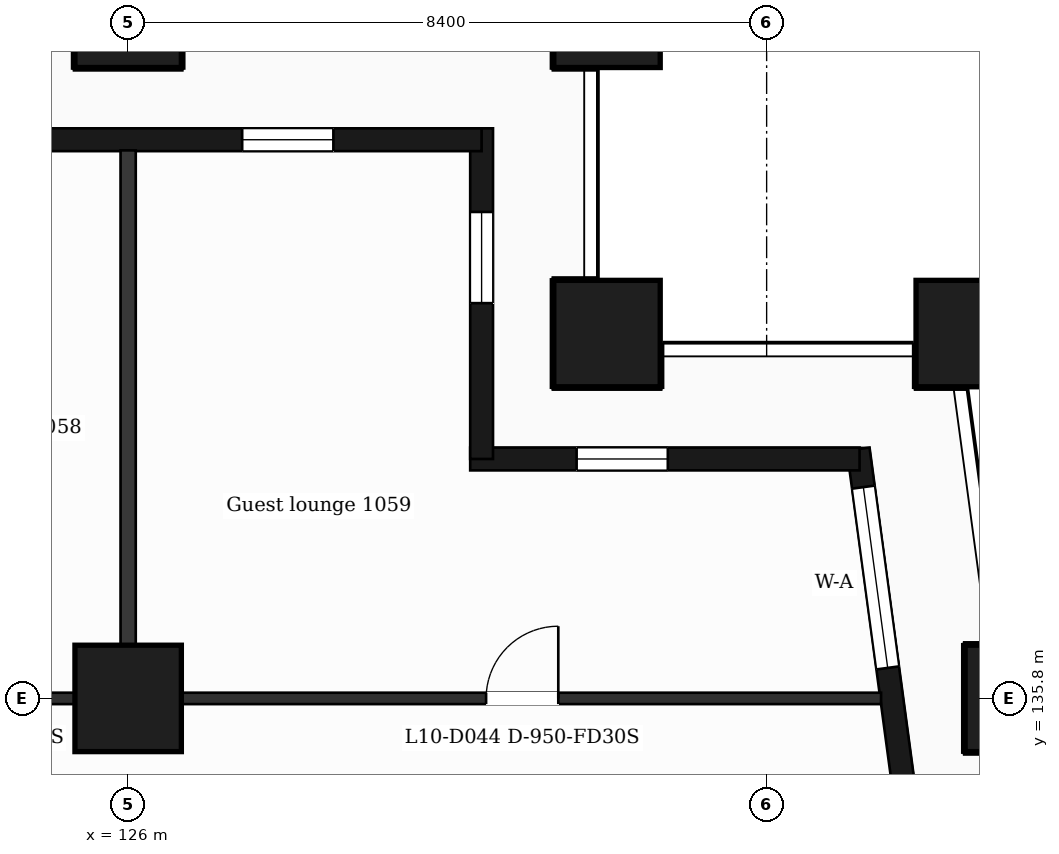
"""IFC4 building model, lengths in metres.
Left out: names, types, materials, properties, quantities, classifications, styles, units other than length and angle.
Written with IfcOpenShell. Run it as: python <this file> out.ifc"""

import sys

from ifc_helpers import new_model, si_unit, direction, frame, frame_2d, origin, origin_2d, place, context, subcontext, project, spatial, rectangle, extrude, element, fill, save


model = new_model("IFC4")
c1 = context("Model", 3, precision=1e-05, world=origin(), true_north=direction((0.0, 1.0)))
c2 = subcontext(c1, "Body", "Model", "MODEL_VIEW")
j1 = project(units=[si_unit("LENGTHUNIT", "METRE"), si_unit("PLANEANGLEUNIT", "RADIAN")], contexts=[c1])
p1 = place(None, origin())
s1 = spatial("IfcSite", under=j1, at=p1, CompositionType="ELEMENT")
p2 = place(p1, origin())
s2 = spatial("IfcBuilding", under=s1, at=p2, CompositionType="ELEMENT")
p3 = place(p2, frame((0.0, 0.0, 53.0)))
s3 = spatial("IfcBuildingStorey", under=s2, at=p3, CompositionType="ELEMENT", Elevation=53.0)
for number, where, z_axis, x_axis in (
    (1, (132.3, 140.6, 0.0), (0.0, 0.0, 1.0), (1.0, 0.0, 0.0)),
    (2, (137.065, 140.6, 0.0), (0.0, 0.0, 1.0), (1.0, 0.0, 0.0)),
    (3, (126.0, 135.8, 0.0), (0.0, 0.0, 1.0), (1.0, 0.0, 0.0)),
    (4, (137.711, 135.8, 0.0), (0.0, 0.0, 1.0), (1.0, 0.0, 0.0)),
    (5, (126.0, 144.8, 0.0), (0.0, 0.0, 1.0), (1.0, 0.0, 0.0)),
    (6, (132.3, 144.8, 0.0), (0.0, 0.0, 1.0), (1.0, 0.0, 0.0)),
):
    element("IfcColumn", number, at=place(p3, frame(where, z_axis=z_axis, x_axis=x_axis)), inside=s3, PredefinedType="COLUMN", context=c2, shape_type="SweptSolid", body=[
        extrude(rectangle(XDim=1.4, YDim=1.4, at=origin_2d()), origin(), (0.0, 0.0, 1.0), 3.5),
    ])
p4 = place(p3, frame((136.504, 132.4, 0.0), z_axis=(0.0, 0.0, 1.0), x_axis=(-0.133399697462, 0.99106231929, 0.0)))
e7 = element("IfcWall", 7, at=p4, inside=s3, PredefinedType="SOLIDWALL", context=c2, shape_type="SweptSolid", body=[
    extrude(rectangle(XDim=6.74, YDim=0.3, at=frame_2d((3.37, 0.0))), origin(), (0.0, 0.0, 1.0), 3.18),
])
p5 = place(p4, frame((1.115, 0.0, 0.0)))
e8 = element("IfcOpeningElement", 8, at=p5, cuts=e7, PredefinedType="OPENING", context=c2, shape_type="SweptSolid", body=[
    extrude(rectangle(XDim=1.2, YDim=2.4, at=frame_2d((0.6, 1.2))), frame((0.0, 0.16, 0.0), z_axis=(0.0, -1.0, 0.0), x_axis=(1.0, 0.0, 0.0)), (0.0, 0.0, 1.0), 0.32),
])
p6 = place(p4, frame((3.835, 0.0, 0.9)))
e9 = element("IfcOpeningElement", 9, at=p6, cuts=e7, PredefinedType="OPENING", context=c2, shape_type="SweptSolid", body=[
    extrude(rectangle(XDim=2.4, YDim=2.1, at=frame_2d((1.2, 1.05))), frame((0.0, 0.16, 0.0), z_axis=(0.0, -1.0, 0.0), x_axis=(1.0, 0.0, 0.0)), (0.0, 0.0, 1.0), 0.32),
])
p7 = place(p3, frame((135.623, 138.95, 0.0), z_axis=(0.0, 0.0, 1.0), x_axis=(-1.0, 0.0, 0.0)))
e10 = element("IfcWall", 10, at=p7, inside=s3, PredefinedType="SOLIDWALL", context=c2, shape_type="SweptSolid", body=[
    extrude(rectangle(XDim=5.123, YDim=0.3, at=frame_2d((2.561, 0.0))), origin(), (0.0, 0.0, 1.0), 3.18),
])
p8 = place(p7, frame((2.523, 0.0, 0.9)))
e11 = element("IfcOpeningElement", 11, at=p8, cuts=e10, PredefinedType="OPENING", context=c2, shape_type="SweptSolid", body=[
    extrude(rectangle(XDim=1.2, YDim=2.1, at=frame_2d((0.6, 1.05))), frame((0.0, 0.16, 0.0), z_axis=(0.0, -1.0, 0.0), x_axis=(1.0, 0.0, 0.0)), (0.0, 0.0, 1.0), 0.32),
])
p9 = place(p3, frame((130.65, 138.95, 0.0), z_axis=(0.0, 0.0, 1.0), x_axis=(0.0, 1.0, 0.0)))
e12 = element("IfcWall", 12, at=p9, inside=s3, PredefinedType="SOLIDWALL", context=c2, shape_type="SweptSolid", body=[
    extrude(rectangle(XDim=4.35, YDim=0.3, at=frame_2d((2.175, 0.0))), origin(), (0.0, 0.0, 1.0), 3.18),
])
p10 = place(p9, frame((2.05, 0.0, 0.9)))
e13 = element("IfcOpeningElement", 13, at=p10, cuts=e12, PredefinedType="OPENING", context=c2, shape_type="SweptSolid", body=[
    extrude(rectangle(XDim=1.2, YDim=2.1, at=frame_2d((0.6, 1.05))), frame((0.0, 0.16, 0.0), z_axis=(0.0, -1.0, 0.0), x_axis=(1.0, 0.0, 0.0)), (0.0, 0.0, 1.0), 0.32),
])
p11 = place(p3, frame((130.65, 143.15, 0.0), z_axis=(0.0, 0.0, 1.0), x_axis=(-1.0, 0.0, 0.0)))
e14 = element("IfcWall", 14, at=p11, inside=s3, PredefinedType="SOLIDWALL", context=c2, shape_type="SweptSolid", body=[
    extrude(rectangle(XDim=16.35, YDim=0.3, at=frame_2d((8.175, 0.0))), origin(), (0.0, 0.0, 1.0), 3.18),
])
p12 = place(p11, frame((1.95, 0.0, 0.9)))
e15 = element("IfcOpeningElement", 15, at=p12, cuts=e14, PredefinedType="OPENING", context=c2, shape_type="SweptSolid", body=[
    extrude(rectangle(XDim=1.2, YDim=2.1, at=frame_2d((0.6, 1.05))), frame((0.0, 0.16, 0.0), z_axis=(0.0, -1.0, 0.0), x_axis=(1.0, 0.0, 0.0)), (0.0, 0.0, 1.0), 0.32),
])
p13 = place(p11, frame((6.15, 0.0, 0.0)))
e16 = element("IfcOpeningElement", 16, at=p13, cuts=e14, PredefinedType="OPENING", context=c2, shape_type="SweptSolid", body=[
    extrude(rectangle(XDim=1.2, YDim=2.4, at=frame_2d((0.6, 1.2))), frame((0.0, 0.16, 0.0), z_axis=(0.0, -1.0, 0.0), x_axis=(1.0, 0.0, 0.0)), (0.0, 0.0, 1.0), 0.32),
])
p14 = place(p11, frame((9.75, 0.0, 0.9)))
e17 = element("IfcOpeningElement", 17, at=p14, cuts=e14, PredefinedType="OPENING", context=c2, shape_type="SweptSolid", body=[
    extrude(rectangle(XDim=2.4, YDim=2.1, at=frame_2d((1.2, 1.05))), frame((0.0, 0.16, 0.0), z_axis=(0.0, -1.0, 0.0), x_axis=(1.0, 0.0, 0.0)), (0.0, 0.0, 1.0), 0.32),
])
p15 = place(p11, frame((13.45, 0.0, 0.9)))
e18 = element("IfcOpeningElement", 18, at=p15, cuts=e14, PredefinedType="OPENING", context=c2, shape_type="SweptSolid", body=[
    extrude(rectangle(XDim=2.4, YDim=2.1, at=frame_2d((1.2, 1.05))), frame((0.0, 0.16, 0.0), z_axis=(0.0, -1.0, 0.0), x_axis=(1.0, 0.0, 0.0)), (0.0, 0.0, 1.0), 0.32),
])
p16 = place(p3, frame((90.895, 135.8, 0.0), z_axis=(0.0, 0.0, 1.0), x_axis=(1.0, 0.0, 0.0)))
e19 = element("IfcWall", 19, at=p16, inside=s3, PredefinedType="PARTITIONING", context=c2, shape_type="SweptSolid", body=[
    extrude(rectangle(XDim=45.011, YDim=0.15, at=frame_2d((22.505, 0.0))), origin(), (0.0, 0.0, 1.0), 3.18),
])
p17 = place(p16, frame((7.675, 0.0, 0.0)))
e20 = element("IfcOpeningElement", 20, at=p17, cuts=e19, PredefinedType="OPENING", context=c2, shape_type="SweptSolid", body=[
    extrude(rectangle(XDim=1.0, YDim=2.1, at=frame_2d((0.5, 1.05))), frame((0.0, 0.085, 0.0), z_axis=(0.0, -1.0, 0.0), x_axis=(1.0, 0.0, 0.0)), (0.0, 0.0, 1.0), 0.17),
])
p18 = place(p16, frame((13.969, 0.0, 0.0)))
e21 = element("IfcOpeningElement", 21, at=p18, cuts=e19, PredefinedType="OPENING", context=c2, shape_type="SweptSolid", body=[
    extrude(rectangle(XDim=0.95, YDim=2.1, at=frame_2d((0.475, 1.05))), frame((0.0, 0.085, 0.0), z_axis=(0.0, -1.0, 0.0), x_axis=(1.0, 0.0, 0.0)), (0.0, 0.0, 1.0), 0.17),
])
p19 = place(p16, frame((24.393, 0.0, 0.0)))
e22 = element("IfcOpeningElement", 22, at=p19, cuts=e19, PredefinedType="OPENING", context=c2, shape_type="SweptSolid", body=[
    extrude(rectangle(XDim=0.95, YDim=2.1, at=frame_2d((0.475, 1.05))), frame((0.0, 0.085, 0.0), z_axis=(0.0, -1.0, 0.0), x_axis=(1.0, 0.0, 0.0)), (0.0, 0.0, 1.0), 0.17),
])
p20 = place(p16, frame((27.692, 0.0, 0.0)))
e23 = element("IfcOpeningElement", 23, at=p20, cuts=e19, PredefinedType="OPENING", context=c2, shape_type="SweptSolid", body=[
    extrude(rectangle(XDim=0.95, YDim=2.1, at=frame_2d((0.475, 1.05))), frame((0.0, 0.085, 0.0), z_axis=(0.0, -1.0, 0.0), x_axis=(1.0, 0.0, 0.0)), (0.0, 0.0, 1.0), 0.17),
])
p21 = place(p16, frame((32.531, 0.0, 0.0)))
e24 = element("IfcOpeningElement", 24, at=p21, cuts=e19, PredefinedType="OPENING", context=c2, shape_type="SweptSolid", body=[
    extrude(rectangle(XDim=0.95, YDim=2.1, at=frame_2d((0.475, 1.05))), frame((0.0, 0.085, 0.0), z_axis=(0.0, -1.0, 0.0), x_axis=(1.0, 0.0, 0.0)), (0.0, 0.0, 1.0), 0.17),
])
p22 = place(p16, frame((39.814, 0.0, 0.0)))
e25 = element("IfcOpeningElement", 25, at=p22, cuts=e19, PredefinedType="OPENING", context=c2, shape_type="SweptSolid", body=[
    extrude(rectangle(XDim=0.95, YDim=2.1, at=frame_2d((0.475, 1.05))), frame((0.0, 0.085, 0.0), z_axis=(0.0, -1.0, 0.0), x_axis=(1.0, 0.0, 0.0)), (0.0, 0.0, 1.0), 0.17),
])
p23 = place(p3, frame((126.0, 135.875, 0.0), z_axis=(0.0, 0.0, 1.0), x_axis=(0.0, 1.0, 0.0)))
e26 = element("IfcWall", 26, at=p23, inside=s3, PredefinedType="PARTITIONING", context=c2, shape_type="SweptSolid", body=[
    extrude(rectangle(XDim=7.135, YDim=0.2, at=frame_2d((3.567, 0.0))), origin(), (0.0, 0.0, 1.0), 3.18),
])
p24 = place(p6, origin())
e27 = element("IfcWindow", 27, at=p24, inside=s3, PartitioningType="SINGLE_PANEL", PredefinedType="WINDOW", context=c2, shape_type="SweptSolid", body=[
    extrude(rectangle(XDim=2.4, YDim=2.1, at=frame_2d((1.2, 1.05))), frame((0.0, 0.03, 0.0), z_axis=(0.0, -1.0, 0.0), x_axis=(1.0, 0.0, 0.0)), (0.0, 0.0, 1.0), 0.06),
])
fill(e9, e27)
p25 = place(p8, origin())
e28 = element("IfcWindow", 28, at=p25, inside=s3, PartitioningType="SINGLE_PANEL", PredefinedType="WINDOW", context=c2, shape_type="SweptSolid", body=[
    extrude(rectangle(XDim=1.2, YDim=2.1, at=frame_2d((0.6, 1.05))), frame((0.0, 0.03, 0.0), z_axis=(0.0, -1.0, 0.0), x_axis=(1.0, 0.0, 0.0)), (0.0, 0.0, 1.0), 0.06),
])
fill(e11, e28)
p26 = place(p10, origin())
e29 = element("IfcWindow", 29, at=p26, inside=s3, PartitioningType="SINGLE_PANEL", PredefinedType="WINDOW", context=c2, shape_type="SweptSolid", body=[
    extrude(rectangle(XDim=1.2, YDim=2.1, at=frame_2d((0.6, 1.05))), frame((0.0, 0.03, 0.0), z_axis=(0.0, -1.0, 0.0), x_axis=(1.0, 0.0, 0.0)), (0.0, 0.0, 1.0), 0.06),
])
fill(e13, e29)
p27 = place(p12, origin())
e30 = element("IfcWindow", 30, at=p27, inside=s3, PartitioningType="SINGLE_PANEL", PredefinedType="WINDOW", context=c2, shape_type="SweptSolid", body=[
    extrude(rectangle(XDim=1.2, YDim=2.1, at=frame_2d((0.6, 1.05))), frame((0.0, 0.03, 0.0), z_axis=(0.0, -1.0, 0.0), x_axis=(1.0, 0.0, 0.0)), (0.0, 0.0, 1.0), 0.06),
])
fill(e15, e30)
p28 = place(p22, origin())
e31 = element("IfcDoor", 31, at=p28, inside=s3, OperationType="SINGLE_SWING_RIGHT", PredefinedType="DOOR", context=c2, shape_type="SweptSolid", body=[
    extrude(rectangle(XDim=0.95, YDim=2.1, at=frame_2d((0.475, 1.05))), frame((0.0, 0.025, 0.0), z_axis=(0.0, -1.0, 0.0), x_axis=(1.0, 0.0, 0.0)), (0.0, 0.0, 1.0), 0.05),
])
fill(e25, e31)
save(model, sys.argv[1])
